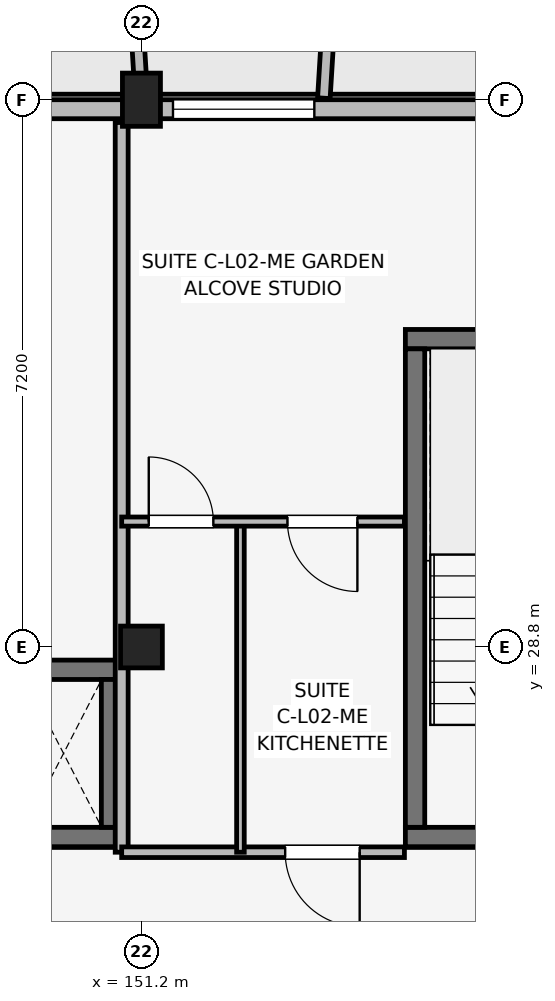
"""IFC4 building model, lengths in metres.
Left out: names, types, materials, properties, quantities, classifications, styles, units other than length and angle.
Written with IfcOpenShell. Run it as: python <this file> out.ifc"""

import sys

from ifc_helpers import new_model, si_unit, direction, frame, frame_2d, origin, origin_2d, place, context, subcontext, project, spatial, rectangle, extrude, element, fill, save


model = new_model("IFC4")
c1 = context("Model", 3, precision=1e-05, world=origin(), true_north=direction((0.0, 1.0)))
c2 = subcontext(c1, "Body", "Model", "MODEL_VIEW")
j1 = project(units=[si_unit("LENGTHUNIT", "METRE"), si_unit("PLANEANGLEUNIT", "RADIAN")], contexts=[c1])
p1 = place(None, origin())
s1 = spatial("IfcSite", under=j1, at=p1, CompositionType="ELEMENT")
p2 = place(p1, origin())
s2 = spatial("IfcBuilding", under=s1, at=p2, CompositionType="ELEMENT")
p3 = place(p2, frame((0.0, 0.0, 8.7)))
s3 = spatial("IfcBuildingStorey", under=s2, at=p3, CompositionType="ELEMENT", Elevation=8.7)
p4 = place(p3, frame((151.2, 28.8, 0.0), z_axis=(0.0, 0.0, 1.0), x_axis=(1.0, 0.0, 0.0)))
e1 = element("IfcColumn", 1, at=p4, inside=s3, PredefinedType="COLUMN", context=c2, shape_type="SweptSolid", body=[
    extrude(rectangle(XDim=0.55, YDim=0.55, at=origin_2d()), origin(), (0.0, 0.0, 1.0), 3.15),
])
p5 = place(p3, frame((151.2, 36.0, 0.0), z_axis=(0.0, 0.0, 1.0), x_axis=(1.0, 0.0, 0.0)))
e2 = element("IfcColumn", 2, at=p5, inside=s3, PredefinedType="COLUMN", context=c2, shape_type="SweptSolid", body=[
    extrude(rectangle(XDim=0.5, YDim=0.7, at=origin_2d()), origin(), (0.0, 0.0, 1.0), 3.15),
])
p6 = place(p3, frame((154.673, 26.3, 0.0), z_axis=(0.0, 0.0, 1.0), x_axis=(1.0, 0.0, 0.0)))
e3 = element("IfcWall", 3, at=p6, inside=s3, PredefinedType="SHEAR", context=c2, shape_type="SweptSolid", body=[
    extrude(rectangle(XDim=3.305, YDim=0.255, at=frame_2d((1.652, 0.0))), origin(), (0.0, 0.0, 1.0), 3.15),
])
p7 = place(p6, frame((1.127, 0.0, 0.0)))
e4 = element("IfcOpeningElement", 4, at=p7, cuts=e3, PredefinedType="OPENING", context=c2, shape_type="SweptSolid", body=[
    extrude(rectangle(XDim=1.05, YDim=2.12, at=frame_2d((0.525, 1.06))), frame((0.0, 0.137, 0.0), z_axis=(0.0, -1.0, 0.0), x_axis=(1.0, 0.0, 0.0)), (0.0, 0.0, 1.0), 0.275),
])
p8 = place(p3, frame((154.673, 32.85, 0.0), z_axis=(0.0, 0.0, 1.0), x_axis=(1.0, 0.0, 0.0)))
e5 = element("IfcWall", 5, at=p8, inside=s3, PredefinedType="SHEAR", context=c2, shape_type="SweptSolid", body=[
    extrude(rectangle(XDim=3.305, YDim=0.255, at=frame_2d((1.652, 0.0))), origin(), (0.0, 0.0, 1.0), 3.15),
])
p9 = place(p3, frame((154.8, 26.427, 0.0), z_axis=(0.0, 0.0, 1.0), x_axis=(0.0, 1.0, 0.0)))
e6 = element("IfcWall", 6, at=p9, inside=s3, PredefinedType="SHEAR", context=c2, shape_type="SweptSolid", body=[
    extrude(rectangle(XDim=6.295, YDim=0.255, at=frame_2d((3.147, 0.0))), origin(), (0.0, 0.0, 1.0), 3.15),
])
for number, where, z_axis, x_axis in (
    (7, (149.123, 26.3, 0.0), (0.0, 0.0, 1.0), (1.0, 0.0, 0.0)),
    (8, (149.123, 28.5, 0.0), (0.0, 0.0, 1.0), (1.0, 0.0, 0.0)),
):
    element("IfcWall", number, at=place(p3, frame(where, z_axis=z_axis, x_axis=x_axis)), inside=s3, PredefinedType="SHEAR", context=c2, shape_type="SweptSolid", body=[
        extrude(rectangle(XDim=1.805, YDim=0.255, at=frame_2d((0.902, 0.0))), origin(), (0.0, 0.0, 1.0), 3.15),
    ])
p10 = place(p3, frame((150.8, 26.427, 0.0), z_axis=(0.0, 0.0, 1.0), x_axis=(0.0, 1.0, 0.0)))
e9 = element("IfcWall", 9, at=p10, inside=s3, PredefinedType="SHEAR", context=c2, shape_type="SweptSolid", body=[
    extrude(rectangle(XDim=1.945, YDim=0.255, at=frame_2d((0.973, 0.0))), origin(), (0.0, 0.0, 1.0), 3.15),
])
p11 = place(p3, frame((162.6, 35.875, 0.0), z_axis=(0.0, 0.0, 1.0), x_axis=(-1.0, 0.0, 0.0)))
e10 = element("IfcWall", 10, at=p11, inside=s3, PredefinedType="SOLIDWALL", context=c2, shape_type="SweptSolid", body=[
    extrude(rectangle(XDim=30.0, YDim=0.25, at=frame_2d((15.0, 0.0))), origin(), (0.0, 0.0, 1.0), 2.43),
])
p12 = place(p11, frame((27.95, 0.0, 0.0), z_axis=(0.0, 0.0, 1.0), x_axis=(-1.0, 0.0, 0.0)))
e11 = element("IfcOpeningElement", 11, at=p12, cuts=e10, PredefinedType="OPENING", context=c2, shape_type="SweptSolid", body=[
    extrude(rectangle(XDim=1.5, YDim=2.15, at=frame_2d((0.75, 1.075))), frame((0.0, 0.135, 0.0), z_axis=(0.0, -1.0, 0.0), x_axis=(1.0, 0.0, 0.0)), (0.0, 0.0, 1.0), 0.27),
])
p13 = place(p11, frame((3.55, 0.0, 0.0), z_axis=(0.0, 0.0, 1.0), x_axis=(-1.0, 0.0, 0.0)))
e12 = element("IfcOpeningElement", 12, at=p13, cuts=e10, PredefinedType="OPENING", context=c2, shape_type="SweptSolid", body=[
    extrude(rectangle(XDim=1.5, YDim=2.15, at=frame_2d((0.75, 1.075))), frame((0.0, 0.135, 0.0), z_axis=(0.0, -1.0, 0.0), x_axis=(1.0, 0.0, 0.0)), (0.0, 0.0, 1.0), 0.27),
])
p14 = place(p11, frame((14.425, 0.0, 0.5)))
e13 = element("IfcOpeningElement", 13, at=p14, cuts=e10, PredefinedType="OPENING", context=c2, shape_type="SweptSolid", body=[
    extrude(rectangle(XDim=1.15, YDim=1.68, at=frame_2d((0.575, 0.84))), frame((0.0, 0.135, 0.0), z_axis=(0.0, -1.0, 0.0), x_axis=(1.0, 0.0, 0.0)), (0.0, 0.0, 1.0), 0.27),
])
p15 = place(p11, frame((9.125, 0.0, 0.7)))
e14 = element("IfcOpeningElement", 14, at=p15, cuts=e10, PredefinedType="OPENING", context=c2, shape_type="SweptSolid", body=[
    extrude(rectangle(XDim=1.86, YDim=1.6, at=frame_2d((0.93, 0.8))), frame((0.0, 0.135, 0.0), z_axis=(0.0, -1.0, 0.0), x_axis=(1.0, 0.0, 0.0)), (0.0, 0.0, 1.0), 0.27),
])
p16 = place(p11, frame((19.015, 0.0, 0.7)))
e15 = element("IfcOpeningElement", 15, at=p16, cuts=e10, PredefinedType="OPENING", context=c2, shape_type="SweptSolid", body=[
    extrude(rectangle(XDim=1.86, YDim=1.6, at=frame_2d((0.93, 0.8))), frame((0.0, 0.135, 0.0), z_axis=(0.0, -1.0, 0.0), x_axis=(1.0, 0.0, 0.0)), (0.0, 0.0, 1.0), 0.27),
])
p17 = place(p3, frame((151.2, 36.02, 0.0), z_axis=(0.0, 0.0, 1.0), x_axis=(-0.061046865508, 0.998134900808, 0.0)))
e16 = element("IfcWall", 16, at=p17, inside=s3, PredefinedType="ELEMENTEDWALL", context=c2, shape_type="SweptSolid", body=[
    extrude(rectangle(XDim=1.964, YDim=0.165, at=frame_2d((0.982, 0.0))), origin(), (0.0, 0.0, 1.0), 2.95),
])
p18 = place(p3, frame((153.6, 36.02, 0.0), z_axis=(0.0, 0.0, 1.0), x_axis=(0.061046865508, 0.998134900808, 0.0)))
e17 = element("IfcWall", 17, at=p18, inside=s3, PredefinedType="ELEMENTEDWALL", context=c2, shape_type="SweptSolid", body=[
    extrude(rectangle(XDim=1.964, YDim=0.165, at=frame_2d((0.982, 0.0))), origin(), (0.0, 0.0, 1.0), 2.55),
])
p19 = place(p3, frame((150.94, 26.1, 0.0), z_axis=(0.0, 0.0, 1.0), x_axis=(0.0, 1.0, 0.0)))
e18 = element("IfcWall", 18, at=p19, inside=s3, PredefinedType="PARTITIONING", context=c2, shape_type="SweptSolid", body=[
    extrude(rectangle(XDim=9.6, YDim=0.17, at=frame_2d((4.8, 0.0))), origin(), (0.0, 0.0, 1.0), 2.38),
])
p20 = place(p3, frame((150.94, 26.1, 0.0), z_axis=(0.0, 0.0, 1.0), x_axis=(1.0, 0.0, 0.0)))
e19 = element("IfcWall", 19, at=p20, inside=s3, PredefinedType="PARTITIONING", context=c2, shape_type="SweptSolid", body=[
    extrude(rectangle(XDim=3.72, YDim=0.14, at=frame_2d((1.86, 0.0))), origin(), (0.0, 0.0, 1.0), 2.38),
])
p21 = place(p20, frame((3.131, 0.0, 0.0), z_axis=(0.0, 0.0, 1.0), x_axis=(-1.0, 0.0, 0.0)))
e20 = element("IfcOpeningElement", 20, at=p21, cuts=e19, PredefinedType="OPENING", context=c2, shape_type="SweptSolid", body=[
    extrude(rectangle(XDim=0.98, YDim=2.1, at=frame_2d((0.49, 1.05))), frame((0.0, 0.08, 0.0), z_axis=(0.0, -1.0, 0.0), x_axis=(1.0, 0.0, 0.0)), (0.0, 0.0, 1.0), 0.16),
])
p22 = place(p3, frame((152.502, 26.1, 0.0), z_axis=(0.0, 0.0, 1.0), x_axis=(0.0, 1.0, 0.0)))
e21 = element("IfcWall", 21, at=p22, inside=s3, PredefinedType="PARTITIONING", context=c2, shape_type="SweptSolid", body=[
    extrude(rectangle(XDim=4.35, YDim=0.1, at=frame_2d((2.175, 0.0))), origin(), (0.0, 0.0, 1.0), 2.375),
])
p23 = place(p3, frame((150.94, 30.45, 0.0), z_axis=(0.0, 0.0, 1.0), x_axis=(1.0, 0.0, 0.0)))
e22 = element("IfcWall", 22, at=p23, inside=s3, PredefinedType="PARTITIONING", context=c2, shape_type="SweptSolid", body=[
    extrude(rectangle(XDim=3.72, YDim=0.12, at=frame_2d((1.86, 0.0))), origin(), (0.0, 0.0, 1.0), 2.38),
])
p24 = place(p23, frame((0.356, 0.0, 0.0)))
e23 = element("IfcOpeningElement", 23, at=p24, cuts=e22, PredefinedType="OPENING", context=c2, shape_type="SweptSolid", body=[
    extrude(rectangle(XDim=0.85, YDim=2.08, at=frame_2d((0.425, 1.04))), frame((0.0, 0.07, 0.0), z_axis=(0.0, -1.0, 0.0), x_axis=(1.0, 0.0, 0.0)), (0.0, 0.0, 1.0), 0.14),
])
p25 = place(p23, frame((3.101, 0.0, 0.0), z_axis=(0.0, 0.0, 1.0), x_axis=(-1.0, 0.0, 0.0)))
e24 = element("IfcOpeningElement", 24, at=p25, cuts=e22, PredefinedType="OPENING", context=c2, shape_type="SweptSolid", body=[
    extrude(rectangle(XDim=0.92, YDim=2.08, at=frame_2d((0.46, 1.04))), frame((0.0, 0.07, 0.0), z_axis=(0.0, -1.0, 0.0), x_axis=(1.0, 0.0, 0.0)), (0.0, 0.0, 1.0), 0.14),
])
p26 = place(p15, origin())
e25 = element("IfcWindow", 25, at=p26, inside=s3, PartitioningType="SINGLE_PANEL", PredefinedType="WINDOW", context=c2, shape_type="SweptSolid", body=[
    extrude(rectangle(XDim=1.86, YDim=1.6, at=frame_2d((0.93, 0.8))), frame((0.0, 0.03, 0.0), z_axis=(0.0, -1.0, 0.0), x_axis=(1.0, 0.0, 0.0)), (0.0, 0.0, 1.0), 0.06),
])
fill(e14, e25)
p27 = place(p21, origin())
e26 = element("IfcDoor", 26, at=p27, inside=s3, OperationType="SINGLE_SWING_RIGHT", PredefinedType="DOOR", context=c2, shape_type="SweptSolid", body=[
    extrude(rectangle(XDim=0.98, YDim=2.1, at=frame_2d((0.49, 1.05))), frame((0.0, 0.025, 0.0), z_axis=(0.0, -1.0, 0.0), x_axis=(1.0, 0.0, 0.0)), (0.0, 0.0, 1.0), 0.05),
])
fill(e20, e26)
p28 = place(p24, origin())
e27 = element("IfcDoor", 27, at=p28, inside=s3, OperationType="SINGLE_SWING_LEFT", PredefinedType="DOOR", context=c2, shape_type="SweptSolid", body=[
    extrude(rectangle(XDim=0.85, YDim=2.08, at=frame_2d((0.425, 1.04))), frame((0.0, 0.025, 0.0), z_axis=(0.0, -1.0, 0.0), x_axis=(1.0, 0.0, 0.0)), (0.0, 0.0, 1.0), 0.05),
])
fill(e23, e27)
p29 = place(p25, origin())
e28 = element("IfcDoor", 28, at=p29, inside=s3, OperationType="SINGLE_SWING_RIGHT", PredefinedType="DOOR", context=c2, shape_type="SweptSolid", body=[
    extrude(rectangle(XDim=0.92, YDim=2.08, at=frame_2d((0.46, 1.04))), frame((0.0, 0.025, 0.0), z_axis=(0.0, -1.0, 0.0), x_axis=(1.0, 0.0, 0.0)), (0.0, 0.0, 1.0), 0.05),
])
fill(e24, e28)
save(model, sys.argv[1])
